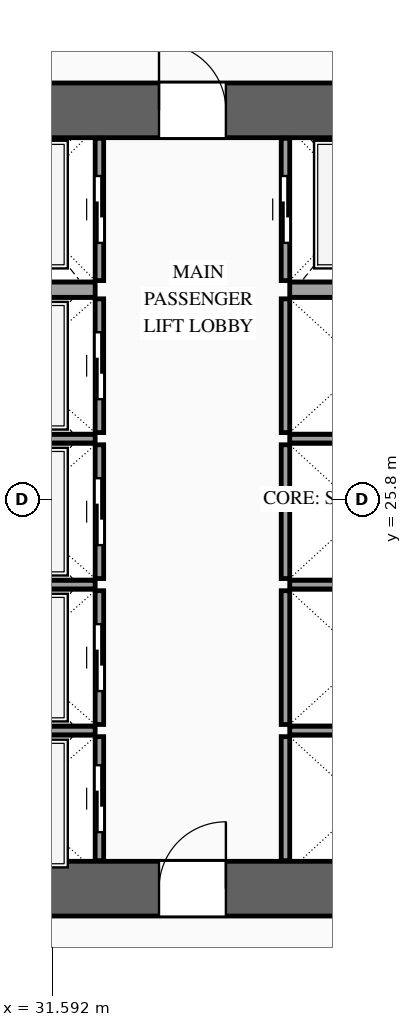
"""IFC4 building model, lengths in metres.
Left out: names, types, materials, properties, quantities, classifications, styles, units other than length and angle.
Written with IfcOpenShell. Run it as: python <this file> out.ifc"""

import sys

from ifc_helpers import new_model, si_unit, direction, frame, frame_2d, origin, place, context, subcontext, project, spatial, rectangle, extrude, source, transform, mapped, element, fill, save


model = new_model("IFC4")
c1 = context("Model", 3, precision=1e-05, world=origin(), true_north=direction((0.0, 1.0)))
c2 = subcontext(c1, "Body", "Model", "MODEL_VIEW")
j1 = project(units=[si_unit("LENGTHUNIT", "METRE"), si_unit("PLANEANGLEUNIT", "RADIAN")], contexts=[c1])
p1 = place(None, origin())
s1 = spatial("IfcSite", under=j1, at=p1, CompositionType="ELEMENT")
p2 = place(p1, origin())
s2 = spatial("IfcBuilding", under=s1, at=p2, CompositionType="ELEMENT")
p3 = place(p2, frame((0.0, 0.0, 74.8)))
s3 = spatial("IfcBuildingStorey", under=s2, at=p3, CompositionType="ELEMENT", Elevation=74.8)
p4 = place(p3, frame((23.35, 19.4, 0.0), z_axis=(0.0, 0.0, 1.0), x_axis=(1.0, 0.0, 0.0)))
e1 = element("IfcWall", 1, at=p4, inside=s3, PredefinedType="SHEAR", context=c2, shape_type="SweptSolid", body=[
    extrude(rectangle(XDim=27.3, YDim=0.9, at=frame_2d((13.65, 0.0))), origin(), (0.0, 0.0, 1.0), 3.6),
])
p5 = place(p4, frame((2.1, 0.0, 0.0)))
e2 = element("IfcOpeningElement", 2, at=p5, cuts=e1, PredefinedType="OPENING", context=c2, shape_type="SweptSolid", body=[
    extrude(rectangle(XDim=1.1, YDim=2.2, at=frame_2d((0.55, 1.1))), frame((0.0, 0.465, 0.0), z_axis=(0.0, -1.0, 0.0), x_axis=(1.0, 0.0, 0.0)), (0.0, 0.0, 1.0), 0.93),
])
p6 = place(p4, frame((10.0, 0.0, 0.0)))
e3 = element("IfcOpeningElement", 3, at=p6, cuts=e1, PredefinedType="OPENING", context=c2, shape_type="SweptSolid", body=[
    extrude(rectangle(XDim=1.1, YDim=2.2, at=frame_2d((0.55, 1.1))), frame((0.0, 0.465, 0.0), z_axis=(0.0, -1.0, 0.0), x_axis=(1.0, 0.0, 0.0)), (0.0, 0.0, 1.0), 0.93),
])
p7 = place(p4, frame((23.2, 0.0, 0.0)))
e4 = element("IfcOpeningElement", 4, at=p7, cuts=e1, PredefinedType="OPENING", context=c2, shape_type="SweptSolid", body=[
    extrude(rectangle(XDim=1.1, YDim=2.2, at=frame_2d((0.55, 1.1))), frame((0.0, 0.465, 0.0), z_axis=(0.0, -1.0, 0.0), x_axis=(1.0, 0.0, 0.0)), (0.0, 0.0, 1.0), 0.93),
])
p8 = place(p4, frame((19.82, 0.0, 0.0)))
e5 = element("IfcOpeningElement", 5, at=p8, cuts=e1, PredefinedType="OPENING", context=c2, shape_type="SweptSolid", body=[
    extrude(rectangle(XDim=0.9, YDim=2.15, at=frame_2d((0.45, 1.075))), frame((0.0, 0.465, 0.0), z_axis=(0.0, -1.0, 0.0), x_axis=(1.0, 0.0, 0.0)), (0.0, 0.0, 1.0), 0.93),
])
p9 = place(p4, frame((18.38, 0.0, 0.0)))
e6 = element("IfcOpeningElement", 6, at=p9, cuts=e1, PredefinedType="OPENING", context=c2, shape_type="SweptSolid", body=[
    extrude(rectangle(XDim=0.9, YDim=2.15, at=frame_2d((0.45, 1.075))), frame((0.0, 0.465, 0.0), z_axis=(0.0, -1.0, 0.0), x_axis=(1.0, 0.0, 0.0)), (0.0, 0.0, 1.0), 0.93),
])
p10 = place(p3, frame((23.35, 32.2, 0.0), z_axis=(0.0, 0.0, 1.0), x_axis=(1.0, 0.0, 0.0)))
e7 = element("IfcWall", 7, at=p10, inside=s3, PredefinedType="SHEAR", context=c2, shape_type="SweptSolid", body=[
    extrude(rectangle(XDim=27.3, YDim=0.9, at=frame_2d((13.65, 0.0))), origin(), (0.0, 0.0, 1.0), 3.6),
])
p11 = place(p10, frame((4.72, 0.0, 0.0)))
e8 = element("IfcOpeningElement", 8, at=p11, cuts=e7, PredefinedType="OPENING", context=c2, shape_type="SweptSolid", body=[
    extrude(rectangle(XDim=0.9, YDim=2.15, at=frame_2d((0.45, 1.075))), frame((0.0, 0.465, 0.0), z_axis=(0.0, -1.0, 0.0), x_axis=(1.0, 0.0, 0.0)), (0.0, 0.0, 1.0), 0.93),
])
p12 = place(p10, frame((10.0, 0.0, 0.0)))
e9 = element("IfcOpeningElement", 9, at=p12, cuts=e7, PredefinedType="OPENING", context=c2, shape_type="SweptSolid", body=[
    extrude(rectangle(XDim=1.1, YDim=2.2, at=frame_2d((0.55, 1.1))), frame((0.0, 0.465, 0.0), z_axis=(0.0, -1.0, 0.0), x_axis=(1.0, 0.0, 0.0)), (0.0, 0.0, 1.0), 0.93),
])
p13 = place(p10, frame((15.85, 0.0, 0.0)))
e10 = element("IfcOpeningElement", 10, at=p13, cuts=e7, PredefinedType="OPENING", context=c2, shape_type="SweptSolid", body=[
    extrude(rectangle(XDim=1.1, YDim=2.2, at=frame_2d((0.55, 1.1))), frame((0.0, 0.465, 0.0), z_axis=(0.0, -1.0, 0.0), x_axis=(1.0, 0.0, 0.0)), (0.0, 0.0, 1.0), 0.93),
])
p14 = place(p10, frame((18.38, 0.0, 0.0)))
e11 = element("IfcOpeningElement", 11, at=p14, cuts=e7, PredefinedType="OPENING", context=c2, shape_type="SweptSolid", body=[
    extrude(rectangle(XDim=0.9, YDim=2.15, at=frame_2d((0.45, 1.075))), frame((0.0, 0.465, 0.0), z_axis=(0.0, -1.0, 0.0), x_axis=(1.0, 0.0, 0.0)), (0.0, 0.0, 1.0), 0.93),
])
p15 = place(p10, frame((19.82, 0.0, 0.0)))
e12 = element("IfcOpeningElement", 12, at=p15, cuts=e7, PredefinedType="OPENING", context=c2, shape_type="SweptSolid", body=[
    extrude(rectangle(XDim=0.9, YDim=2.15, at=frame_2d((0.45, 1.075))), frame((0.0, 0.465, 0.0), z_axis=(0.0, -1.0, 0.0), x_axis=(1.0, 0.0, 0.0)), (0.0, 0.0, 1.0), 0.93),
])
p16 = place(p3, frame((32.37, 19.86, 0.0), z_axis=(0.0, 0.0, 1.0), x_axis=(0.0, 1.0, 0.0)))
e13 = element("IfcWall", 13, at=p16, inside=s3, PredefinedType="SOLIDWALL", context=c2, shape_type="SweptSolid", body=[
    extrude(rectangle(XDim=2.04, YDim=0.14, at=frame_2d((1.02, 0.0))), origin(), (0.0, 0.0, 1.0), 3.38),
])
p17 = place(p16, frame((0.47, 0.0, 0.0)))
e14 = element("IfcOpeningElement", 14, at=p17, cuts=e13, PredefinedType="OPENING", context=c2, shape_type="SweptSolid", body=[
    extrude(rectangle(XDim=1.1, YDim=2.2, at=frame_2d((0.55, 1.1))), frame((0.0, 0.085, 0.0), z_axis=(0.0, -1.0, 0.0), x_axis=(1.0, 0.0, 0.0)), (0.0, 0.0, 1.0), 0.17),
])
m1 = source(origin(), c2, "Body", "SweptSolid", [
    extrude(rectangle(XDim=2.5, YDim=0.14, at=frame_2d((1.25, 0.0))), origin(), (0.0, 0.0, 1.0), 3.38),
])
p18 = place(p3, frame((29.8, 22.0, 0.0), z_axis=(0.0, 0.0, 1.0), x_axis=(1.0, 0.0, 0.0)))
e15 = element("IfcWall", 15, at=p18, inside=s3, PredefinedType="SOLIDWALL", context=c2, shape_type="MappedRepresentation", body=[
    mapped(m1, transform((0.0, 0.0, 0.0), scale=1.0)),
])
p19 = place(p3, frame((32.37, 22.1, 0.0), z_axis=(0.0, 0.0, 1.0), x_axis=(0.0, 1.0, 0.0)))
e16 = element("IfcWall", 16, at=p19, inside=s3, PredefinedType="SOLIDWALL", context=c2, shape_type="SweptSolid", body=[
    extrude(rectangle(XDim=2.2, YDim=0.14, at=frame_2d((1.1, 0.0))), origin(), (0.0, 0.0, 1.0), 3.38),
])
p20 = place(p19, frame((0.55, 0.0, 0.0)))
e17 = element("IfcOpeningElement", 17, at=p20, cuts=e16, PredefinedType="OPENING", context=c2, shape_type="SweptSolid", body=[
    extrude(rectangle(XDim=1.1, YDim=2.2, at=frame_2d((0.55, 1.1))), frame((0.0, 0.085, 0.0), z_axis=(0.0, -1.0, 0.0), x_axis=(1.0, 0.0, 0.0)), (0.0, 0.0, 1.0), 0.17),
])
p21 = place(p3, frame((29.8, 24.4, 0.0), z_axis=(0.0, 0.0, 1.0), x_axis=(1.0, 0.0, 0.0)))
e18 = element("IfcWall", 18, at=p21, inside=s3, PredefinedType="SOLIDWALL", context=c2, shape_type="MappedRepresentation", body=[
    mapped(m1, transform((0.0, 0.0, 0.0), scale=1.0)),
])
p22 = place(p3, frame((32.37, 24.5, 0.0), z_axis=(0.0, 0.0, 1.0), x_axis=(0.0, 1.0, 0.0)))
e19 = element("IfcWall", 19, at=p22, inside=s3, PredefinedType="SOLIDWALL", context=c2, shape_type="SweptSolid", body=[
    extrude(rectangle(XDim=2.2, YDim=0.14, at=frame_2d((1.1, 0.0))), origin(), (0.0, 0.0, 1.0), 3.38),
])
p23 = place(p22, frame((0.55, 0.0, 0.0)))
e20 = element("IfcOpeningElement", 20, at=p23, cuts=e19, PredefinedType="OPENING", context=c2, shape_type="SweptSolid", body=[
    extrude(rectangle(XDim=1.1, YDim=2.2, at=frame_2d((0.55, 1.1))), frame((0.0, 0.085, 0.0), z_axis=(0.0, -1.0, 0.0), x_axis=(1.0, 0.0, 0.0)), (0.0, 0.0, 1.0), 0.17),
])
p24 = place(p3, frame((29.8, 26.8, 0.0), z_axis=(0.0, 0.0, 1.0), x_axis=(1.0, 0.0, 0.0)))
e21 = element("IfcWall", 21, at=p24, inside=s3, PredefinedType="SOLIDWALL", context=c2, shape_type="MappedRepresentation", body=[
    mapped(m1, transform((0.0, 0.0, 0.0), scale=1.0)),
])
p25 = place(p3, frame((32.37, 26.9, 0.0), z_axis=(0.0, 0.0, 1.0), x_axis=(0.0, 1.0, 0.0)))
e22 = element("IfcWall", 22, at=p25, inside=s3, PredefinedType="SOLIDWALL", context=c2, shape_type="SweptSolid", body=[
    extrude(rectangle(XDim=2.2, YDim=0.14, at=frame_2d((1.1, 0.0))), origin(), (0.0, 0.0, 1.0), 3.38),
])
p26 = place(p25, frame((0.55, 0.0, 0.0)))
e23 = element("IfcOpeningElement", 23, at=p26, cuts=e22, PredefinedType="OPENING", context=c2, shape_type="SweptSolid", body=[
    extrude(rectangle(XDim=1.1, YDim=2.2, at=frame_2d((0.55, 1.1))), frame((0.0, 0.085, 0.0), z_axis=(0.0, -1.0, 0.0), x_axis=(1.0, 0.0, 0.0)), (0.0, 0.0, 1.0), 0.17),
])
p27 = place(p3, frame((32.37, 29.4, 0.0), z_axis=(0.0, 0.0, 1.0), x_axis=(0.0, 1.0, 0.0)))
e24 = element("IfcWall", 24, at=p27, inside=s3, PredefinedType="SOLIDWALL", context=c2, shape_type="SweptSolid", body=[
    extrude(rectangle(XDim=2.34, YDim=0.14, at=frame_2d((1.17, 0.0))), origin(), (0.0, 0.0, 1.0), 3.38),
])
p28 = place(p27, frame((0.62, 0.0, 0.0)))
e25 = element("IfcOpeningElement", 25, at=p28, cuts=e24, PredefinedType="OPENING", context=c2, shape_type="SweptSolid", body=[
    extrude(rectangle(XDim=1.1, YDim=2.2, at=frame_2d((0.55, 1.1))), frame((0.0, 0.085, 0.0), z_axis=(0.0, -1.0, 0.0), x_axis=(1.0, 0.0, 0.0)), (0.0, 0.0, 1.0), 0.17),
])
m2 = source(origin(), c2, "Body", "SweptSolid", [
    extrude(rectangle(XDim=2.5, YDim=0.25, at=frame_2d((1.25, 0.0))), origin(), (0.0, 0.0, 1.0), 3.38),
])
p29 = place(p3, frame((29.8, 29.25, 0.0), z_axis=(0.0, 0.0, 1.0), x_axis=(1.0, 0.0, 0.0)))
e26 = element("IfcWall", 26, at=p29, inside=s3, PredefinedType="SOLIDWALL", context=c2, shape_type="MappedRepresentation", body=[
    mapped(m2, transform((0.0, 0.0, 0.0), scale=1.0)),
])
m3 = source(origin(), c2, "Body", "SweptSolid", [
    extrude(rectangle(XDim=2.04, YDim=0.14, at=frame_2d((1.02, 0.0))), origin(), (0.0, 0.0, 1.0), 3.38),
])
p30 = place(p3, frame((35.43, 19.86, 0.0), z_axis=(0.0, 0.0, 1.0), x_axis=(0.0, 1.0, 0.0)))
e27 = element("IfcWall", 27, at=p30, inside=s3, PredefinedType="SOLIDWALL", context=c2, shape_type="MappedRepresentation", body=[
    mapped(m3, transform((0.0, 0.0, 0.0), scale=1.0)),
])
m4 = source(origin(), c2, "Body", "SweptSolid", [
    extrude(rectangle(XDim=2.4, YDim=0.14, at=frame_2d((1.2, 0.0))), origin(), (0.0, 0.0, 1.0), 3.38),
])
p31 = place(p3, frame((35.5, 22.0, 0.0), z_axis=(0.0, 0.0, 1.0), x_axis=(1.0, 0.0, 0.0)))
e28 = element("IfcWall", 28, at=p31, inside=s3, PredefinedType="SOLIDWALL", context=c2, shape_type="MappedRepresentation", body=[
    mapped(m4, transform((0.0, 0.0, 0.0), scale=1.0)),
])
m5 = source(origin(), c2, "Body", "SweptSolid", [
    extrude(rectangle(XDim=2.2, YDim=0.14, at=frame_2d((1.1, 0.0))), origin(), (0.0, 0.0, 1.0), 3.38),
])
p32 = place(p3, frame((35.43, 22.1, 0.0), z_axis=(0.0, 0.0, 1.0), x_axis=(0.0, 1.0, 0.0)))
e29 = element("IfcWall", 29, at=p32, inside=s3, PredefinedType="SOLIDWALL", context=c2, shape_type="MappedRepresentation", body=[
    mapped(m5, transform((0.0, 0.0, 0.0), scale=1.0)),
])
p33 = place(p3, frame((35.5, 24.4, 0.0), z_axis=(0.0, 0.0, 1.0), x_axis=(1.0, 0.0, 0.0)))
e30 = element("IfcWall", 30, at=p33, inside=s3, PredefinedType="SOLIDWALL", context=c2, shape_type="MappedRepresentation", body=[
    mapped(m4, transform((0.0, 0.0, 0.0), scale=1.0)),
])
p34 = place(p3, frame((35.43, 24.5, 0.0), z_axis=(0.0, 0.0, 1.0), x_axis=(0.0, 1.0, 0.0)))
e31 = element("IfcWall", 31, at=p34, inside=s3, PredefinedType="SOLIDWALL", context=c2, shape_type="MappedRepresentation", body=[
    mapped(m5, transform((0.0, 0.0, 0.0), scale=1.0)),
])
p35 = place(p3, frame((35.5, 26.8, 0.0), z_axis=(0.0, 0.0, 1.0), x_axis=(1.0, 0.0, 0.0)))
e32 = element("IfcWall", 32, at=p35, inside=s3, PredefinedType="SOLIDWALL", context=c2, shape_type="MappedRepresentation", body=[
    mapped(m4, transform((0.0, 0.0, 0.0), scale=1.0)),
])
m6 = source(origin(), c2, "Body", "SweptSolid", [
    extrude(rectangle(XDim=2.2, YDim=0.14, at=frame_2d((1.1, 0.0))), origin(), (0.0, 0.0, 1.0), 3.38),
])
p36 = place(p3, frame((35.43, 26.9, 0.0), z_axis=(0.0, 0.0, 1.0), x_axis=(0.0, 1.0, 0.0)))
e33 = element("IfcWall", 33, at=p36, inside=s3, PredefinedType="SOLIDWALL", context=c2, shape_type="MappedRepresentation", body=[
    mapped(m6, transform((0.0, 0.0, 0.0), scale=1.0)),
])
p37 = place(p3, frame((35.43, 29.4, 0.0), z_axis=(0.0, 0.0, 1.0), x_axis=(0.0, 1.0, 0.0)))
e34 = element("IfcWall", 34, at=p37, inside=s3, PredefinedType="SOLIDWALL", context=c2, shape_type="SweptSolid", body=[
    extrude(rectangle(XDim=2.34, YDim=0.14, at=frame_2d((1.17, 0.0))), origin(), (0.0, 0.0, 1.0), 3.38),
])
p38 = place(p37, frame((0.62, 0.0, 0.0)))
e35 = element("IfcOpeningElement", 35, at=p38, cuts=e34, PredefinedType="OPENING", context=c2, shape_type="SweptSolid", body=[
    extrude(rectangle(XDim=1.1, YDim=2.2, at=frame_2d((0.55, 1.1))), frame((0.0, 0.085, 0.0), z_axis=(0.0, -1.0, 0.0), x_axis=(1.0, 0.0, 0.0)), (0.0, 0.0, 1.0), 0.17),
])
m7 = source(origin(), c2, "Body", "SweptSolid", [
    extrude(rectangle(XDim=2.4, YDim=0.25, at=frame_2d((1.2, 0.0))), origin(), (0.0, 0.0, 1.0), 3.38),
])
p39 = place(p3, frame((35.5, 29.25, 0.0), z_axis=(0.0, 0.0, 1.0), x_axis=(1.0, 0.0, 0.0)))
e36 = element("IfcWall", 36, at=p39, inside=s3, PredefinedType="SOLIDWALL", context=c2, shape_type="MappedRepresentation", body=[
    mapped(m7, transform((0.0, 0.0, 0.0), scale=1.0)),
])
m8 = source(origin(), c2, "Body", "SweptSolid", [
    extrude(rectangle(XDim=1.1, YDim=2.2, at=frame_2d((0.55, 1.1))), frame((0.0, 0.025, 0.0), z_axis=(0.0, -1.0, 0.0), x_axis=(1.0, 0.0, 0.0)), (0.0, 0.0, 1.0), 0.05),
])
p40 = place(p17, origin())
e37 = element("IfcDoor", 37, at=p40, inside=s3, OperationType="SLIDING_TO_LEFT", PredefinedType="DOOR", context=c2, shape_type="MappedRepresentation", body=[
    mapped(m8, transform((0.0, 0.0, 0.0), scale=1.0)),
])
fill(e14, e37)
p41 = place(p20, origin())
e38 = element("IfcDoor", 38, at=p41, inside=s3, OperationType="SLIDING_TO_RIGHT", PredefinedType="DOOR", context=c2, shape_type="MappedRepresentation", body=[
    mapped(m8, transform((0.0, 0.0, 0.0), scale=1.0)),
])
fill(e17, e38)
p42 = place(p23, origin())
e39 = element("IfcDoor", 39, at=p42, inside=s3, OperationType="SLIDING_TO_LEFT", PredefinedType="DOOR", context=c2, shape_type="MappedRepresentation", body=[
    mapped(m8, transform((0.0, 0.0, 0.0), scale=1.0)),
])
fill(e20, e39)
p43 = place(p26, origin())
e40 = element("IfcDoor", 40, at=p43, inside=s3, OperationType="SLIDING_TO_RIGHT", PredefinedType="DOOR", context=c2, shape_type="MappedRepresentation", body=[
    mapped(m8, transform((0.0, 0.0, 0.0), scale=1.0)),
])
fill(e23, e40)
p44 = place(p28, origin())
e41 = element("IfcDoor", 41, at=p44, inside=s3, OperationType="SLIDING_TO_LEFT", PredefinedType="DOOR", context=c2, shape_type="MappedRepresentation", body=[
    mapped(m8, transform((0.0, 0.0, 0.0), scale=1.0)),
])
fill(e25, e41)
p45 = place(p38, origin())
e42 = element("IfcDoor", 42, at=p45, inside=s3, OperationType="SLIDING_TO_RIGHT", PredefinedType="DOOR", context=c2, shape_type="MappedRepresentation", body=[
    mapped(m8, transform((0.0, 0.0, 0.0), scale=1.0)),
])
fill(e35, e42)
m9 = source(origin(), c2, "Body", "SweptSolid", [
    extrude(rectangle(XDim=1.1, YDim=2.2, at=frame_2d((0.55, 1.1))), frame((0.0, 0.025, 0.0), z_axis=(0.0, -1.0, 0.0), x_axis=(1.0, 0.0, 0.0)), (0.0, 0.0, 1.0), 0.05),
])
p46 = place(p6, origin())
e43 = element("IfcDoor", 43, at=p46, inside=s3, OperationType="SINGLE_SWING_RIGHT", PredefinedType="DOOR", context=c2, shape_type="MappedRepresentation", body=[
    mapped(m9, transform((0.0, 0.0, 0.0), scale=1.0)),
])
fill(e3, e43)
p47 = place(p12, origin())
e44 = element("IfcDoor", 44, at=p47, inside=s3, OperationType="SINGLE_SWING_LEFT", PredefinedType="DOOR", context=c2, shape_type="MappedRepresentation", body=[
    mapped(m9, transform((0.0, 0.0, 0.0), scale=1.0)),
])
fill(e9, e44)
save(model, sys.argv[1])
